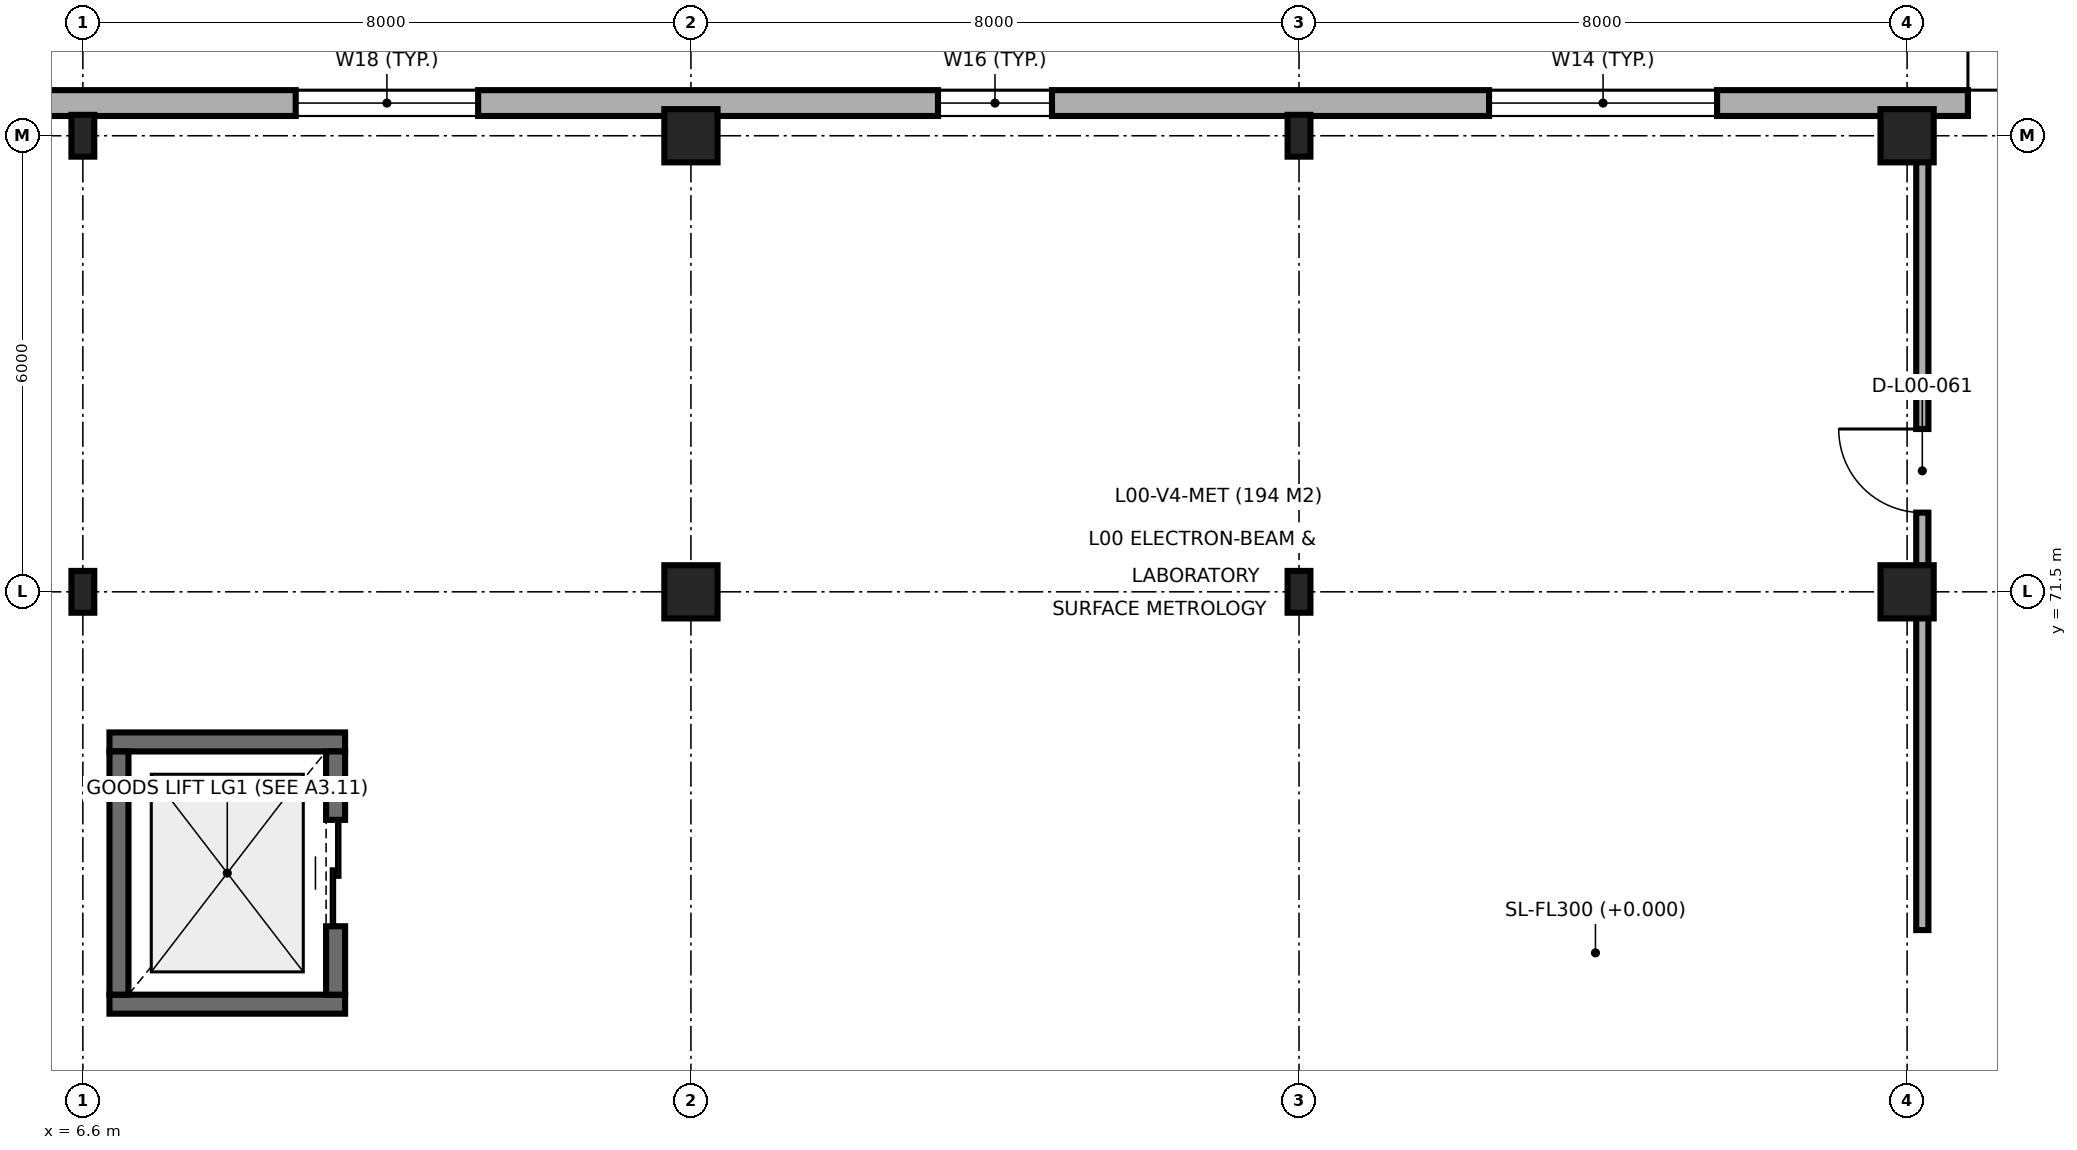
"""IFC4 building model, lengths in metres.
Left out: names, types, materials, properties, quantities, classifications, styles, units other than length and angle.
Written with IfcOpenShell. Run it as: python <this file> out.ifc"""

import sys

from ifc_helpers import new_model, si_unit, direction, frame, frame_2d, origin, origin_2d, place, context, subcontext, project, spatial, rectangle, i_section, extrude, element, fill, save


model = new_model("IFC4")
c1 = context("Model", 3, precision=1e-05, world=origin(), true_north=direction((0.0, 1.0)))
c2 = subcontext(c1, "Body", "Model", "MODEL_VIEW")
j1 = project(units=[si_unit("LENGTHUNIT", "METRE"), si_unit("PLANEANGLEUNIT", "RADIAN")], contexts=[c1])
p1 = place(None, origin())
s1 = spatial("IfcSite", under=j1, at=p1, CompositionType="ELEMENT")
p2 = place(p1, origin())
s2 = spatial("IfcBuilding", under=s1, at=p2, CompositionType="ELEMENT")
p3 = place(p2, origin())
s3 = spatial("IfcBuildingStorey", under=s2, at=p3, CompositionType="ELEMENT", Elevation=0.0)
for number, where, z_axis, x_axis in (
    (1, (6.6, 71.5, 0.0), (0.0, 0.0, 1.0), (1.0, 0.0, 0.0)),
    (2, (6.6, 77.5, 0.0), (0.0, 0.0, 1.0), (1.0, 0.0, 0.0)),
):
    element("IfcColumn", number, at=place(p3, frame(where, z_axis=z_axis, x_axis=x_axis)), inside=s3, PredefinedType="COLUMN", context=c2, shape_type="SweptSolid", body=[
        extrude(i_section(OverallWidth=0.3, OverallDepth=0.55, WebThickness=0.015, FlangeThickness=0.029, FilletRadius=0.027, at=origin_2d()), origin(), (0.0, 0.0, 1.0), 4.8),
    ])
for number, where, z_axis, x_axis in (
    (3, (14.6, 71.5, 0.0), (0.0, 0.0, 1.0), (1.0, 0.0, 0.0)),
    (4, (14.6, 77.5, 0.0), (0.0, 0.0, 1.0), (1.0, 0.0, 0.0)),
):
    element("IfcColumn", number, at=place(p3, frame(where, z_axis=z_axis, x_axis=x_axis)), inside=s3, PredefinedType="COLUMN", context=c2, shape_type="SweptSolid", body=[
        extrude(rectangle(XDim=0.7, YDim=0.7, at=origin_2d()), origin(), (0.0, 0.0, 1.0), 4.8),
    ])
for number, where, z_axis, x_axis in (
    (5, (22.6, 71.5, 0.0), (0.0, 0.0, 1.0), (1.0, 0.0, 0.0)),
    (6, (22.6, 77.5, 0.0), (0.0, 0.0, 1.0), (1.0, 0.0, 0.0)),
):
    element("IfcColumn", number, at=place(p3, frame(where, z_axis=z_axis, x_axis=x_axis)), inside=s3, PredefinedType="COLUMN", context=c2, shape_type="SweptSolid", body=[
        extrude(i_section(OverallWidth=0.3, OverallDepth=0.55, WebThickness=0.015, FlangeThickness=0.029, FilletRadius=0.027, at=origin_2d()), origin(), (0.0, 0.0, 1.0), 4.8),
    ])
for number, where, z_axis, x_axis in (
    (7, (30.6, 71.5, 0.0), (0.0, 0.0, 1.0), (1.0, 0.0, 0.0)),
    (8, (30.6, 77.5, 0.0), (0.0, 0.0, 1.0), (1.0, 0.0, 0.0)),
):
    element("IfcColumn", number, at=place(p3, frame(where, z_axis=z_axis, x_axis=x_axis)), inside=s3, PredefinedType="COLUMN", context=c2, shape_type="SweptSolid", body=[
        extrude(rectangle(XDim=0.7, YDim=0.7, at=origin_2d()), origin(), (0.0, 0.0, 1.0), 4.8),
    ])
for number, where, z_axis, x_axis in (
    (9, (6.95, 66.075, 0.0), (0.0, 0.0, 1.0), (1.0, 0.0, 0.0)),
    (10, (10.05, 69.525, 0.0), (0.0, 0.0, 1.0), (-1.0, 0.0, 0.0)),
):
    element("IfcWall", number, at=place(p3, frame(where, z_axis=z_axis, x_axis=x_axis)), inside=s3, PredefinedType="SHEAR", context=c2, shape_type="SweptSolid", body=[
        extrude(rectangle(XDim=3.1, YDim=0.25, at=frame_2d((1.55, 0.0))), origin(), (0.0, 0.0, 1.0), 4.8),
    ])
p4 = place(p3, frame((7.075, 69.4, 0.0), z_axis=(0.0, 0.0, 1.0), x_axis=(0.0, -1.0, 0.0)))
e11 = element("IfcWall", 11, at=p4, inside=s3, PredefinedType="SHEAR", context=c2, shape_type="SweptSolid", body=[
    extrude(rectangle(XDim=3.2, YDim=0.25, at=frame_2d((1.6, 0.0))), origin(), (0.0, 0.0, 1.0), 4.8),
])
p5 = place(p3, frame((9.925, 66.2, 0.0), z_axis=(0.0, 0.0, 1.0), x_axis=(0.0, 1.0, 0.0)))
e12 = element("IfcWall", 12, at=p5, inside=s3, PredefinedType="SHEAR", context=c2, shape_type="SweptSolid", body=[
    extrude(rectangle(XDim=3.2, YDim=0.25, at=frame_2d((1.6, 0.0))), origin(), (0.0, 0.0, 1.0), 4.8),
])
p6 = place(p5, frame((0.9, 0.0, 0.0)))
e13 = element("IfcOpeningElement", 13, at=p6, cuts=e12, PredefinedType="OPENING", context=c2, shape_type="SweptSolid", body=[
    extrude(rectangle(XDim=1.4, YDim=2.2, at=frame_2d((0.7, 1.1))), frame((0.0, 0.135, 0.0), z_axis=(0.0, -1.0, 0.0), x_axis=(1.0, 0.0, 0.0)), (0.0, 0.0, 1.0), 0.27),
])
p7 = place(p3, frame((43.677, 77.93, 0.0), z_axis=(0.0, 0.0, 1.0), x_axis=(-1.0, 0.0, 0.0)))
e14 = element("IfcWall", 14, at=p7, inside=s3, PredefinedType="SOLIDWALL", context=c2, shape_type="SweptSolid", body=[
    extrude(rectangle(XDim=38.077, YDim=0.34, at=frame_2d((19.039, 0.0))), origin(), (0.0, 0.0, 1.0), 4.55),
])
p8 = place(p7, frame((10.277, 0.0, 0.0)))
e15 = element("IfcOpeningElement", 15, at=p8, cuts=e14, PredefinedType="OPENING", context=c2, shape_type="SweptSolid", body=[
    extrude(rectangle(XDim=2.0, YDim=2.4, at=frame_2d((1.0, 1.2))), frame((0.0, 0.18, 0.0), z_axis=(0.0, -1.0, 0.0), x_axis=(1.0, 0.0, 0.0)), (0.0, 0.0, 1.0), 0.36),
])
p9 = place(p7, frame((1.689, 0.0, 0.9)))
e16 = element("IfcOpeningElement", 16, at=p9, cuts=e14, PredefinedType="OPENING", context=c2, shape_type="SweptSolid", body=[
    extrude(rectangle(XDim=1.8, YDim=2.1, at=frame_2d((0.9, 1.05))), frame((0.0, 0.18, 0.0), z_axis=(0.0, -1.0, 0.0), x_axis=(1.0, 0.0, 0.0)), (0.0, 0.0, 1.0), 0.36),
])
p10 = place(p7, frame((5.877, 0.0, 0.9)))
e17 = element("IfcOpeningElement", 17, at=p10, cuts=e14, PredefinedType="OPENING", context=c2, shape_type="SweptSolid", body=[
    extrude(rectangle(XDim=2.4, YDim=2.1, at=frame_2d((1.2, 1.05))), frame((0.0, 0.18, 0.0), z_axis=(0.0, -1.0, 0.0), x_axis=(1.0, 0.0, 0.0)), (0.0, 0.0, 1.0), 0.36),
])
p11 = place(p7, frame((15.577, 0.0, 0.9)))
e18 = element("IfcOpeningElement", 18, at=p11, cuts=e14, PredefinedType="OPENING", context=c2, shape_type="SweptSolid", body=[
    extrude(rectangle(XDim=3.0, YDim=2.1, at=frame_2d((1.5, 1.05))), frame((0.0, 0.18, 0.0), z_axis=(0.0, -1.0, 0.0), x_axis=(1.0, 0.0, 0.0)), (0.0, 0.0, 1.0), 0.36),
])
p12 = place(p7, frame((24.327, 0.0, 0.9)))
e19 = element("IfcOpeningElement", 19, at=p12, cuts=e14, PredefinedType="OPENING", context=c2, shape_type="SweptSolid", body=[
    extrude(rectangle(XDim=1.5, YDim=1.5, at=frame_2d((0.75, 0.75))), frame((0.0, 0.18, 0.0), z_axis=(0.0, -1.0, 0.0), x_axis=(1.0, 0.0, 0.0)), (0.0, 0.0, 1.0), 0.36),
])
p13 = place(p7, frame((31.877, 0.0, 0.9)))
e20 = element("IfcOpeningElement", 20, at=p13, cuts=e14, PredefinedType="OPENING", context=c2, shape_type="SweptSolid", body=[
    extrude(rectangle(XDim=2.4, YDim=1.5, at=frame_2d((1.2, 0.75))), frame((0.0, 0.18, 0.0), z_axis=(0.0, -1.0, 0.0), x_axis=(1.0, 0.0, 0.0)), (0.0, 0.0, 1.0), 0.36),
])
p14 = place(p3, frame((30.8, 67.05, 0.0), z_axis=(0.0, 0.0, 1.0), x_axis=(0.0, 1.0, 0.0)))
e21 = element("IfcWall", 21, at=p14, inside=s3, PredefinedType="PARTITIONING", context=c2, shape_type="SweptSolid", body=[
    extrude(rectangle(XDim=4.2, YDim=0.16, at=frame_2d((2.1, 0.0))), origin(), (0.0, 0.0, 1.0), 4.05),
])
p15 = place(p3, frame((30.8, 71.75, 0.0), z_axis=(0.0, 0.0, 1.0), x_axis=(0.0, 1.0, 0.0)))
e22 = element("IfcWall", 22, at=p15, inside=s3, PredefinedType="PARTITIONING", context=c2, shape_type="SweptSolid", body=[
    extrude(rectangle(XDim=5.5, YDim=0.16, at=frame_2d((2.75, 0.0))), origin(), (0.0, 0.0, 1.0), 4.05),
])
p16 = place(p15, frame((0.792, 0.0, 0.0)))
e23 = element("IfcOpeningElement", 23, at=p16, cuts=e22, PredefinedType="OPENING", context=c2, shape_type="SweptSolid", body=[
    extrude(rectangle(XDim=1.1, YDim=2.15, at=frame_2d((0.55, 1.075))), frame((0.0, 0.09, 0.0), z_axis=(0.0, -1.0, 0.0), x_axis=(1.0, 0.0, 0.0)), (0.0, 0.0, 1.0), 0.18),
])
p17 = place(p6, origin())
e24 = element("IfcDoor", 24, at=p17, inside=s3, OperationType="DOUBLE_DOOR_SLIDING", PredefinedType="DOOR", context=c2, shape_type="SweptSolid", body=[
    extrude(rectangle(XDim=1.4, YDim=2.2, at=frame_2d((0.7, 1.1))), frame((0.0, 0.025, 0.0), z_axis=(0.0, -1.0, 0.0), x_axis=(1.0, 0.0, 0.0)), (0.0, 0.0, 1.0), 0.05),
])
fill(e13, e24)
p18 = place(p8, frame((2.0, 0.0, 0.0), z_axis=(0.0, 0.0, 1.0), x_axis=(-1.0, 0.0, 0.0)))
e25 = element("IfcDoor", 25, at=p18, inside=s3, OperationType="DOUBLE_DOOR_SINGLE_SWING", PredefinedType="DOOR", context=c2, shape_type="SweptSolid", body=[
    extrude(rectangle(XDim=2.0, YDim=2.4, at=frame_2d((1.0, 1.2))), frame((0.0, 0.025, 0.0), z_axis=(0.0, -1.0, 0.0), x_axis=(1.0, 0.0, 0.0)), (0.0, 0.0, 1.0), 0.05),
])
fill(e15, e25)
p19 = place(p11, origin())
e26 = element("IfcWindow", 26, at=p19, inside=s3, PartitioningType="SINGLE_PANEL", PredefinedType="WINDOW", context=c2, shape_type="SweptSolid", body=[
    extrude(rectangle(XDim=3.0, YDim=2.1, at=frame_2d((1.5, 1.05))), frame((0.0, 0.03, 0.0), z_axis=(0.0, -1.0, 0.0), x_axis=(1.0, 0.0, 0.0)), (0.0, 0.0, 1.0), 0.06),
])
fill(e18, e26)
p20 = place(p12, origin())
e27 = element("IfcWindow", 27, at=p20, inside=s3, PartitioningType="SINGLE_PANEL", PredefinedType="WINDOW", context=c2, shape_type="SweptSolid", body=[
    extrude(rectangle(XDim=1.5, YDim=1.5, at=frame_2d((0.75, 0.75))), frame((0.0, 0.03, 0.0), z_axis=(0.0, -1.0, 0.0), x_axis=(1.0, 0.0, 0.0)), (0.0, 0.0, 1.0), 0.06),
])
fill(e19, e27)
p21 = place(p13, origin())
e28 = element("IfcWindow", 28, at=p21, inside=s3, PartitioningType="SINGLE_PANEL", PredefinedType="WINDOW", context=c2, shape_type="SweptSolid", body=[
    extrude(rectangle(XDim=2.4, YDim=1.5, at=frame_2d((1.2, 0.75))), frame((0.0, 0.03, 0.0), z_axis=(0.0, -1.0, 0.0), x_axis=(1.0, 0.0, 0.0)), (0.0, 0.0, 1.0), 0.06),
])
fill(e20, e28)
p22 = place(p16, origin())
e29 = element("IfcDoor", 29, at=p22, inside=s3, OperationType="SINGLE_SWING_RIGHT", PredefinedType="DOOR", context=c2, shape_type="SweptSolid", body=[
    extrude(rectangle(XDim=1.1, YDim=2.15, at=frame_2d((0.55, 1.075))), frame((0.0, 0.025, 0.0), z_axis=(0.0, -1.0, 0.0), x_axis=(1.0, 0.0, 0.0)), (0.0, 0.0, 1.0), 0.05),
])
fill(e23, e29)
save(model, sys.argv[1])
